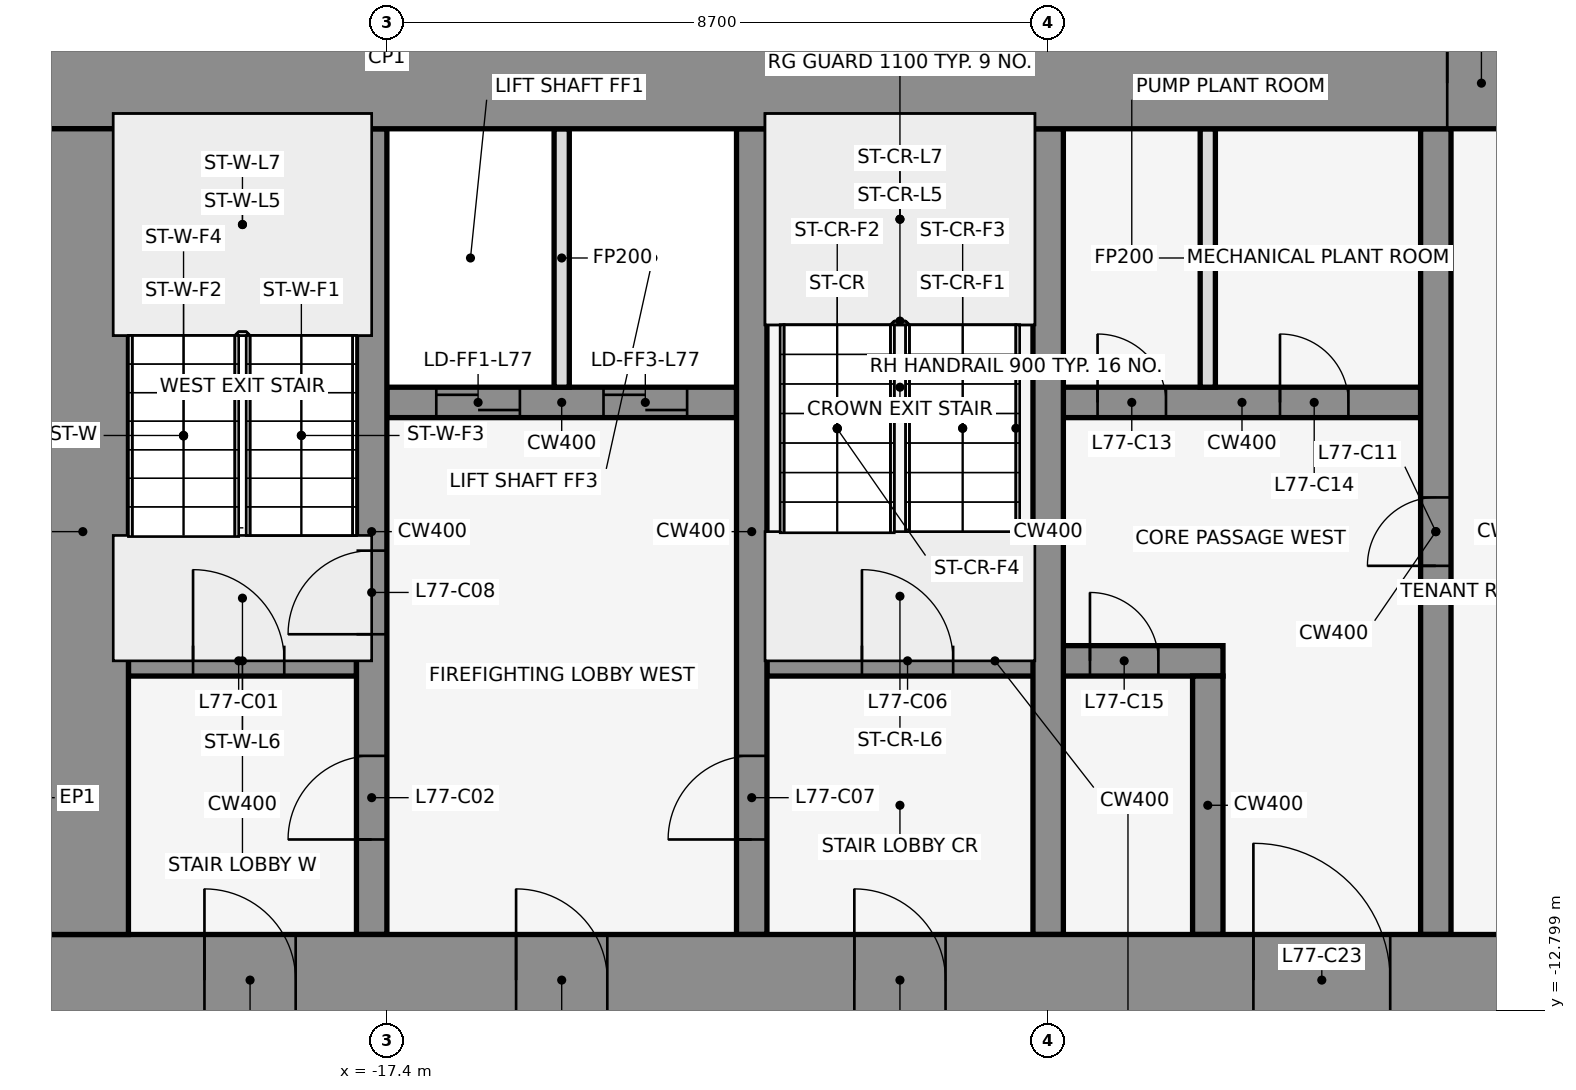
"""IFC4 building model, lengths in metres.
Left out: names, types, materials, properties, quantities, classifications, styles, units other than length and angle.
Written with IfcOpenShell. Run it as: python <this file> out.ifc"""

import sys

from ifc_helpers import new_model, si_unit, direction, frame, frame_2d, origin, place, context, subcontext, project, spatial, rectangle, extrude, element, fill, save


model = new_model("IFC4")
c1 = context("Model", 3, precision=1e-05, world=origin(), true_north=direction((0.0, 1.0)))
c2 = subcontext(c1, "Body", "Model", "MODEL_VIEW")
j1 = project(units=[si_unit("LENGTHUNIT", "METRE"), si_unit("PLANEANGLEUNIT", "RADIAN")], contexts=[c1])
p1 = place(None, origin())
s1 = spatial("IfcSite", under=j1, at=p1, CompositionType="ELEMENT")
p2 = place(p1, origin())
s2 = spatial("IfcBuilding", under=s1, at=p2, CompositionType="ELEMENT")
p3 = place(p2, frame((0.0, 0.0, 342.5)))
s3 = spatial("IfcBuildingStorey", under=s2, at=p3, CompositionType="ELEMENT", Elevation=342.5)
p4 = place(p3, frame((-14.599, 1.08, 0.0), z_axis=(0.0, 0.0, 1.0), x_axis=(-0.83981312244, -0.542875602121, 0.0)))
e1 = element("IfcWall", 1, at=p4, inside=s3, PredefinedType="STANDARD", context=c2, shape_type="SweptSolid", body=[
    extrude(rectangle(XDim=2.183, YDim=0.25, at=frame_2d((1.091, 0.0))), origin(), (0.0, 0.0, 1.0), 5.2),
])
p5 = place(p3, frame((-20.8, -8.2, 0.0), z_axis=(0.0, 0.0, 1.0), x_axis=(1.0, 0.0, 0.0)))
e2 = element("IfcWall", 2, at=p5, inside=s3, PredefinedType="SHEAR", context=c2, shape_type="SweptSolid", body=[
    extrude(rectangle(XDim=3.0, YDim=0.4, at=frame_2d((1.5, 0.0))), origin(), (0.0, 0.0, 1.0), 5.4),
])
p6 = place(p5, frame((0.85, 0.0, 0.0)))
e3 = element("IfcOpeningElement", 3, at=p6, cuts=e2, PredefinedType="OPENING", context=c2, shape_type="SweptSolid", body=[
    extrude(rectangle(XDim=1.2, YDim=2.1, at=frame_2d((0.6, 1.05))), frame((0.0, 0.212, 0.0), z_axis=(0.0, -1.0, 0.0), x_axis=(1.0, 0.0, 0.0)), (0.0, 0.0, 1.0), 0.424),
])
p7 = place(p3, frame((-12.4, -8.2, 0.0), z_axis=(0.0, 0.0, 1.0), x_axis=(1.0, 0.0, 0.0)))
e4 = element("IfcWall", 4, at=p7, inside=s3, PredefinedType="SHEAR", context=c2, shape_type="SweptSolid", body=[
    extrude(rectangle(XDim=6.0, YDim=0.4, at=frame_2d((3.0, 0.0))), origin(), (0.0, 0.0, 1.0), 5.4),
])
p8 = place(p7, frame((1.25, 0.0, 0.0)))
e5 = element("IfcOpeningElement", 5, at=p8, cuts=e4, PredefinedType="OPENING", context=c2, shape_type="SweptSolid", body=[
    extrude(rectangle(XDim=1.2, YDim=2.1, at=frame_2d((0.6, 1.05))), frame((0.0, 0.212, 0.0), z_axis=(0.0, -1.0, 0.0), x_axis=(1.0, 0.0, 0.0)), (0.0, 0.0, 1.0), 0.424),
])
p9 = place(p7, frame((4.25, 0.0, 0.0)))
e6 = element("IfcOpeningElement", 6, at=p9, cuts=e4, PredefinedType="OPENING", context=c2, shape_type="SweptSolid", body=[
    extrude(rectangle(XDim=0.9, YDim=2.1, at=frame_2d((0.45, 1.05))), frame((0.0, 0.212, 0.0), z_axis=(0.0, -1.0, 0.0), x_axis=(1.0, 0.0, 0.0)), (0.0, 0.0, 1.0), 0.424),
])
p10 = place(p3, frame((-17.4, -4.8, 0.0), z_axis=(0.0, 0.0, 1.0), x_axis=(1.0, 0.0, 0.0)))
e7 = element("IfcWall", 7, at=p10, inside=s3, PredefinedType="SHEAR", context=c2, shape_type="SweptSolid", body=[
    extrude(rectangle(XDim=4.6, YDim=0.4, at=frame_2d((2.3, 0.0))), origin(), (0.0, 0.0, 1.0), 5.4),
])
p11 = place(p10, frame((0.65, 0.0, 0.0)))
e8 = element("IfcOpeningElement", 8, at=p11, cuts=e7, PredefinedType="OPENING", context=c2, shape_type="SweptSolid", body=[
    extrude(rectangle(XDim=1.1, YDim=2.1, at=frame_2d((0.55, 1.05))), frame((0.0, 0.212, 0.0), z_axis=(0.0, -1.0, 0.0), x_axis=(1.0, 0.0, 0.0)), (0.0, 0.0, 1.0), 0.424),
])
p12 = place(p10, frame((2.85, 0.0, 0.0)))
e9 = element("IfcOpeningElement", 9, at=p12, cuts=e7, PredefinedType="OPENING", context=c2, shape_type="SweptSolid", body=[
    extrude(rectangle(XDim=1.1, YDim=2.1, at=frame_2d((0.55, 1.05))), frame((0.0, 0.212, 0.0), z_axis=(0.0, -1.0, 0.0), x_axis=(1.0, 0.0, 0.0)), (0.0, 0.0, 1.0), 0.424),
])
p13 = place(p3, frame((-8.5, -4.8, 0.0), z_axis=(0.0, 0.0, 1.0), x_axis=(1.0, 0.0, 0.0)))
e10 = element("IfcWall", 10, at=p13, inside=s3, PredefinedType="SHEAR", context=c2, shape_type="SweptSolid", body=[
    extrude(rectangle(XDim=4.7, YDim=0.4, at=frame_2d((2.35, 0.0))), origin(), (0.0, 0.0, 1.0), 5.4),
])
p14 = place(p13, frame((0.45, 0.0, 0.0)))
e11 = element("IfcOpeningElement", 11, at=p14, cuts=e10, PredefinedType="OPENING", context=c2, shape_type="SweptSolid", body=[
    extrude(rectangle(XDim=0.9, YDim=2.1, at=frame_2d((0.45, 1.05))), frame((0.0, 0.212, 0.0), z_axis=(0.0, -1.0, 0.0), x_axis=(1.0, 0.0, 0.0)), (0.0, 0.0, 1.0), 0.424),
])
p15 = place(p13, frame((2.85, 0.0, 0.0)))
e12 = element("IfcOpeningElement", 12, at=p15, cuts=e10, PredefinedType="OPENING", context=c2, shape_type="SweptSolid", body=[
    extrude(rectangle(XDim=0.9, YDim=2.1, at=frame_2d((0.45, 1.05))), frame((0.0, 0.212, 0.0), z_axis=(0.0, -1.0, 0.0), x_axis=(1.0, 0.0, 0.0)), (0.0, 0.0, 1.0), 0.424),
])
p16 = place(p3, frame((-17.6, -11.8, 0.0), z_axis=(0.0, 0.0, 1.0), x_axis=(0.0, 1.0, 0.0)))
e13 = element("IfcWall", 13, at=p16, inside=s3, PredefinedType="SHEAR", context=c2, shape_type="SweptSolid", body=[
    extrude(rectangle(XDim=10.6, YDim=0.4, at=frame_2d((5.3, 0.0))), origin(), (0.0, 0.0, 1.0), 5.4),
])
p17 = place(p16, frame((1.25, 0.0, 0.0)))
e14 = element("IfcOpeningElement", 14, at=p17, cuts=e13, PredefinedType="OPENING", context=c2, shape_type="SweptSolid", body=[
    extrude(rectangle(XDim=1.1, YDim=2.1, at=frame_2d((0.55, 1.05))), frame((0.0, 0.212, 0.0), z_axis=(0.0, -1.0, 0.0), x_axis=(1.0, 0.0, 0.0)), (0.0, 0.0, 1.0), 0.424),
])
p18 = place(p16, frame((3.95, 0.0, 0.0)))
e15 = element("IfcOpeningElement", 15, at=p18, cuts=e13, PredefinedType="OPENING", context=c2, shape_type="SweptSolid", body=[
    extrude(rectangle(XDim=1.1, YDim=2.1, at=frame_2d((0.55, 1.05))), frame((0.0, 0.212, 0.0), z_axis=(0.0, -1.0, 0.0), x_axis=(1.0, 0.0, 0.0)), (0.0, 0.0, 1.0), 0.424),
])
p19 = place(p3, frame((-15.1, -4.6, 0.0), z_axis=(0.0, 0.0, 1.0), x_axis=(0.0, 1.0, 0.0)))
e16 = element("IfcWall", 16, at=p19, inside=s3, PredefinedType="PARTITIONING", context=c2, shape_type="SweptSolid", body=[
    extrude(rectangle(XDim=3.4, YDim=0.2, at=frame_2d((1.7, 0.0))), origin(), (0.0, 0.0, 1.0), 4.268),
])
p20 = place(p3, frame((-12.6, -11.8, 0.0), z_axis=(0.0, 0.0, 1.0), x_axis=(0.0, 1.0, 0.0)))
e17 = element("IfcWall", 17, at=p20, inside=s3, PredefinedType="SHEAR", context=c2, shape_type="SweptSolid", body=[
    extrude(rectangle(XDim=10.6, YDim=0.4, at=frame_2d((5.3, 0.0))), origin(), (0.0, 0.0, 1.0), 5.4),
])
p21 = place(p20, frame((1.25, 0.0, 0.0)))
e18 = element("IfcOpeningElement", 18, at=p21, cuts=e17, PredefinedType="OPENING", context=c2, shape_type="SweptSolid", body=[
    extrude(rectangle(XDim=1.1, YDim=2.1, at=frame_2d((0.55, 1.05))), frame((0.0, 0.212, 0.0), z_axis=(0.0, -1.0, 0.0), x_axis=(1.0, 0.0, 0.0)), (0.0, 0.0, 1.0), 0.424),
])
p22 = place(p3, frame((-8.7, -11.8, 0.0), z_axis=(0.0, 0.0, 1.0), x_axis=(0.0, 1.0, 0.0)))
e19 = element("IfcWall", 19, at=p22, inside=s3, PredefinedType="SHEAR", context=c2, shape_type="SweptSolid", body=[
    extrude(rectangle(XDim=10.6, YDim=0.4, at=frame_2d((5.3, 0.0))), origin(), (0.0, 0.0, 1.0), 5.4),
])
p23 = place(p3, frame((-6.6, -11.8, 0.0), z_axis=(0.0, 0.0, 1.0), x_axis=(0.0, 1.0, 0.0)))
e20 = element("IfcWall", 20, at=p23, inside=s3, PredefinedType="SHEAR", context=c2, shape_type="SweptSolid", body=[
    extrude(rectangle(XDim=3.4, YDim=0.4, at=frame_2d((1.7, 0.0))), origin(), (0.0, 0.0, 1.0), 5.4),
])
p24 = place(p3, frame((-6.6, -4.6, 0.0), z_axis=(0.0, 0.0, 1.0), x_axis=(0.0, 1.0, 0.0)))
e21 = element("IfcWall", 21, at=p24, inside=s3, PredefinedType="PARTITIONING", context=c2, shape_type="SweptSolid", body=[
    extrude(rectangle(XDim=3.4, YDim=0.2, at=frame_2d((1.7, 0.0))), origin(), (0.0, 0.0, 1.0), 4.268),
])
p25 = place(p3, frame((-3.6, -11.8, 0.0), z_axis=(0.0, 0.0, 1.0), x_axis=(0.0, 1.0, 0.0)))
e22 = element("IfcWall", 22, at=p25, inside=s3, PredefinedType="SHEAR", context=c2, shape_type="SweptSolid", body=[
    extrude(rectangle(XDim=10.6, YDim=0.4, at=frame_2d((5.3, 0.0))), origin(), (0.0, 0.0, 1.0), 5.4),
])
p26 = place(p25, frame((4.85, 0.0, 0.0)))
e23 = element("IfcOpeningElement", 23, at=p26, cuts=e22, PredefinedType="OPENING", context=c2, shape_type="SweptSolid", body=[
    extrude(rectangle(XDim=0.9, YDim=2.1, at=frame_2d((0.45, 1.05))), frame((0.0, 0.212, 0.0), z_axis=(0.0, -1.0, 0.0), x_axis=(1.0, 0.0, 0.0)), (0.0, 0.0, 1.0), 0.424),
])
p27 = place(p3, frame((-22.0, -0.6, 0.0), z_axis=(0.0, 0.0, 1.0), x_axis=(1.0, 0.0, 0.0)))
e24 = element("IfcWall", 24, at=p27, inside=s3, PredefinedType="SHEAR", context=c2, shape_type="SweptSolid", body=[
    extrude(rectangle(XDim=44.0, YDim=1.2, at=frame_2d((22.0, 0.0))), origin(), (0.0, 0.0, 1.0), 5.4),
])
p28 = place(p27, frame((18.55, 0.0, 0.0)))
e25 = element("IfcOpeningElement", 25, at=p28, cuts=e24, PredefinedType="OPENING", context=c2, shape_type="SweptSolid", body=[
    extrude(rectangle(XDim=0.9, YDim=2.1, at=frame_2d((0.45, 1.05))), frame((0.0, 0.612, 0.0), z_axis=(0.0, -1.0, 0.0), x_axis=(1.0, 0.0, 0.0)), (0.0, 0.0, 1.0), 1.224),
])
p29 = place(p27, frame((24.55, 0.0, 0.0)))
e26 = element("IfcOpeningElement", 26, at=p29, cuts=e24, PredefinedType="OPENING", context=c2, shape_type="SweptSolid", body=[
    extrude(rectangle(XDim=0.9, YDim=2.1, at=frame_2d((0.45, 1.05))), frame((0.0, 0.612, 0.0), z_axis=(0.0, -1.0, 0.0), x_axis=(1.0, 0.0, 0.0)), (0.0, 0.0, 1.0), 1.224),
])
p30 = place(p3, frame((-22.0, -12.4, 0.0), z_axis=(0.0, 0.0, 1.0), x_axis=(1.0, 0.0, 0.0)))
e27 = element("IfcWall", 27, at=p30, inside=s3, PredefinedType="SHEAR", context=c2, shape_type="SweptSolid", body=[
    extrude(rectangle(XDim=44.0, YDim=1.2, at=frame_2d((22.0, 0.0))), origin(), (0.0, 0.0, 1.0), 5.4),
])
p31 = place(p30, frame((2.2, 0.0, 0.0)))
e28 = element("IfcOpeningElement", 28, at=p31, cuts=e27, PredefinedType="OPENING", context=c2, shape_type="SweptSolid", body=[
    extrude(rectangle(XDim=1.2, YDim=2.1, at=frame_2d((0.6, 1.05))), frame((0.0, 0.612, 0.0), z_axis=(0.0, -1.0, 0.0), x_axis=(1.0, 0.0, 0.0)), (0.0, 0.0, 1.0), 1.224),
])
p32 = place(p30, frame((21.4, 0.0, 0.0)))
e29 = element("IfcOpeningElement", 29, at=p32, cuts=e27, PredefinedType="OPENING", context=c2, shape_type="SweptSolid", body=[
    extrude(rectangle(XDim=1.2, YDim=2.1, at=frame_2d((0.6, 1.05))), frame((0.0, 0.612, 0.0), z_axis=(0.0, -1.0, 0.0), x_axis=(1.0, 0.0, 0.0)), (0.0, 0.0, 1.0), 1.224),
])
p33 = place(p30, frame((40.6, 0.0, 0.0)))
e30 = element("IfcOpeningElement", 30, at=p33, cuts=e27, PredefinedType="OPENING", context=c2, shape_type="SweptSolid", body=[
    extrude(rectangle(XDim=1.2, YDim=2.1, at=frame_2d((0.6, 1.05))), frame((0.0, 0.612, 0.0), z_axis=(0.0, -1.0, 0.0), x_axis=(1.0, 0.0, 0.0)), (0.0, 0.0, 1.0), 1.224),
])
p34 = place(p30, frame((10.75, 0.0, 0.0)))
e31 = element("IfcOpeningElement", 31, at=p34, cuts=e27, PredefinedType="OPENING", context=c2, shape_type="SweptSolid", body=[
    extrude(rectangle(XDim=1.2, YDim=2.1, at=frame_2d((0.6, 1.05))), frame((0.0, 0.612, 0.0), z_axis=(0.0, -1.0, 0.0), x_axis=(1.0, 0.0, 0.0)), (0.0, 0.0, 1.0), 1.224),
])
p35 = place(p30, frame((16.0, 0.0, 0.0)))
e32 = element("IfcOpeningElement", 32, at=p35, cuts=e27, PredefinedType="OPENING", context=c2, shape_type="SweptSolid", body=[
    extrude(rectangle(XDim=1.8, YDim=2.1, at=frame_2d((0.9, 1.05))), frame((0.0, 0.612, 0.0), z_axis=(0.0, -1.0, 0.0), x_axis=(1.0, 0.0, 0.0)), (0.0, 0.0, 1.0), 1.224),
])
p36 = place(p30, frame((6.3, 0.0, 0.0)))
e33 = element("IfcOpeningElement", 33, at=p36, cuts=e27, PredefinedType="OPENING", context=c2, shape_type="SweptSolid", body=[
    extrude(rectangle(XDim=1.2, YDim=2.1, at=frame_2d((0.6, 1.05))), frame((0.0, 0.612, 0.0), z_axis=(0.0, -1.0, 0.0), x_axis=(1.0, 0.0, 0.0)), (0.0, 0.0, 1.0), 1.224),
])
p37 = place(p30, frame((26.2, 0.0, 0.0)))
e34 = element("IfcOpeningElement", 34, at=p37, cuts=e27, PredefinedType="OPENING", context=c2, shape_type="SweptSolid", body=[
    extrude(rectangle(XDim=1.8, YDim=2.1, at=frame_2d((0.9, 1.05))), frame((0.0, 0.612, 0.0), z_axis=(0.0, -1.0, 0.0), x_axis=(1.0, 0.0, 0.0)), (0.0, 0.0, 1.0), 1.224),
])
p38 = place(p30, frame((36.5, 0.0, 0.0)))
e35 = element("IfcOpeningElement", 35, at=p38, cuts=e27, PredefinedType="OPENING", context=c2, shape_type="SweptSolid", body=[
    extrude(rectangle(XDim=1.2, YDim=2.1, at=frame_2d((0.6, 1.05))), frame((0.0, 0.612, 0.0), z_axis=(0.0, -1.0, 0.0), x_axis=(1.0, 0.0, 0.0)), (0.0, 0.0, 1.0), 1.224),
])
p39 = place(p3, frame((-21.4, -11.8, 0.0), z_axis=(0.0, 0.0, 1.0), x_axis=(0.0, 1.0, 0.0)))
e36 = element("IfcWall", 36, at=p39, inside=s3, PredefinedType="SHEAR", context=c2, shape_type="SweptSolid", body=[
    extrude(rectangle(XDim=10.6, YDim=1.2, at=frame_2d((5.3, 0.0))), origin(), (0.0, 0.0, 1.0), 5.4),
])
p40 = place(p6, origin())
e37 = element("IfcDoor", 37, at=p40, inside=s3, OperationType="SINGLE_SWING_LEFT", PredefinedType="DOOR", context=c2, shape_type="SweptSolid", body=[
    extrude(rectangle(XDim=1.2, YDim=2.1, at=frame_2d((0.6, 1.05))), frame((0.0, 0.025, 0.0), z_axis=(0.0, -1.0, 0.0), x_axis=(1.0, 0.0, 0.0)), (0.0, 0.0, 1.0), 0.05),
])
fill(e3, e37)
p41 = place(p17, frame((1.1, 0.0, 0.0), z_axis=(0.0, 0.0, 1.0), x_axis=(-1.0, 0.0, 0.0)))
e38 = element("IfcDoor", 38, at=p41, inside=s3, OperationType="SINGLE_SWING_LEFT", PredefinedType="DOOR", context=c2, shape_type="SweptSolid", body=[
    extrude(rectangle(XDim=1.1, YDim=2.1, at=frame_2d((0.55, 1.05))), frame((0.0, 0.025, 0.0), z_axis=(0.0, -1.0, 0.0), x_axis=(1.0, 0.0, 0.0)), (0.0, 0.0, 1.0), 0.05),
])
fill(e14, e38)
p42 = place(p8, origin())
e39 = element("IfcDoor", 39, at=p42, inside=s3, OperationType="SINGLE_SWING_RIGHT", PredefinedType="DOOR", context=c2, shape_type="SweptSolid", body=[
    extrude(rectangle(XDim=1.2, YDim=2.1, at=frame_2d((0.6, 1.05))), frame((0.0, 0.025, 0.0), z_axis=(0.0, -1.0, 0.0), x_axis=(1.0, 0.0, 0.0)), (0.0, 0.0, 1.0), 0.05),
])
fill(e5, e39)
p43 = place(p21, origin())
e40 = element("IfcDoor", 40, at=p43, inside=s3, OperationType="SINGLE_SWING_LEFT", PredefinedType="DOOR", context=c2, shape_type="SweptSolid", body=[
    extrude(rectangle(XDim=1.1, YDim=2.1, at=frame_2d((0.55, 1.05))), frame((0.0, 0.025, 0.0), z_axis=(0.0, -1.0, 0.0), x_axis=(1.0, 0.0, 0.0)), (0.0, 0.0, 1.0), 0.05),
])
fill(e18, e40)
p44 = place(p11, origin())
e41 = element("IfcDoor", 41, at=p44, inside=s3, OperationType="DOUBLE_DOOR_SLIDING", PredefinedType="DOOR", context=c2, shape_type="SweptSolid", body=[
    extrude(rectangle(XDim=1.1, YDim=2.1, at=frame_2d((0.55, 1.05))), frame((0.0, 0.025, 0.0), z_axis=(0.0, -1.0, 0.0), x_axis=(1.0, 0.0, 0.0)), (0.0, 0.0, 1.0), 0.05),
])
fill(e8, e41)
p45 = place(p12, origin())
e42 = element("IfcDoor", 42, at=p45, inside=s3, OperationType="DOUBLE_DOOR_SLIDING", PredefinedType="DOOR", context=c2, shape_type="SweptSolid", body=[
    extrude(rectangle(XDim=1.1, YDim=2.1, at=frame_2d((0.55, 1.05))), frame((0.0, 0.025, 0.0), z_axis=(0.0, -1.0, 0.0), x_axis=(1.0, 0.0, 0.0)), (0.0, 0.0, 1.0), 0.05),
])
fill(e9, e42)
p46 = place(p18, frame((1.1, 0.0, 0.0), z_axis=(0.0, 0.0, 1.0), x_axis=(-1.0, 0.0, 0.0)))
e43 = element("IfcDoor", 43, at=p46, inside=s3, OperationType="SINGLE_SWING_LEFT", PredefinedType="DOOR", context=c2, shape_type="SweptSolid", body=[
    extrude(rectangle(XDim=1.1, YDim=2.1, at=frame_2d((0.55, 1.05))), frame((0.0, 0.025, 0.0), z_axis=(0.0, -1.0, 0.0), x_axis=(1.0, 0.0, 0.0)), (0.0, 0.0, 1.0), 0.05),
])
fill(e15, e43)
p47 = place(p26, frame((0.9, 0.0, 0.0), z_axis=(0.0, 0.0, 1.0), x_axis=(-1.0, 0.0, 0.0)))
e44 = element("IfcDoor", 44, at=p47, inside=s3, OperationType="SINGLE_SWING_RIGHT", PredefinedType="DOOR", context=c2, shape_type="SweptSolid", body=[
    extrude(rectangle(XDim=0.9, YDim=2.1, at=frame_2d((0.45, 1.05))), frame((0.0, 0.025, 0.0), z_axis=(0.0, -1.0, 0.0), x_axis=(1.0, 0.0, 0.0)), (0.0, 0.0, 1.0), 0.05),
])
fill(e23, e44)
p48 = place(p14, origin())
e45 = element("IfcDoor", 45, at=p48, inside=s3, OperationType="SINGLE_SWING_LEFT", PredefinedType="DOOR", context=c2, shape_type="SweptSolid", body=[
    extrude(rectangle(XDim=0.9, YDim=2.1, at=frame_2d((0.45, 1.05))), frame((0.0, 0.025, 0.0), z_axis=(0.0, -1.0, 0.0), x_axis=(1.0, 0.0, 0.0)), (0.0, 0.0, 1.0), 0.05),
])
fill(e11, e45)
p49 = place(p15, origin())
e46 = element("IfcDoor", 46, at=p49, inside=s3, OperationType="SINGLE_SWING_RIGHT", PredefinedType="DOOR", context=c2, shape_type="SweptSolid", body=[
    extrude(rectangle(XDim=0.9, YDim=2.1, at=frame_2d((0.45, 1.05))), frame((0.0, 0.025, 0.0), z_axis=(0.0, -1.0, 0.0), x_axis=(1.0, 0.0, 0.0)), (0.0, 0.0, 1.0), 0.05),
])
fill(e12, e46)
p50 = place(p9, frame((0.9, 0.0, 0.0), z_axis=(0.0, 0.0, 1.0), x_axis=(-1.0, 0.0, 0.0)))
e47 = element("IfcDoor", 47, at=p50, inside=s3, OperationType="SINGLE_SWING_RIGHT", PredefinedType="DOOR", context=c2, shape_type="SweptSolid", body=[
    extrude(rectangle(XDim=0.9, YDim=2.1, at=frame_2d((0.45, 1.05))), frame((0.0, 0.025, 0.0), z_axis=(0.0, -1.0, 0.0), x_axis=(1.0, 0.0, 0.0)), (0.0, 0.0, 1.0), 0.05),
])
fill(e6, e47)
p51 = place(p28, origin())
e48 = element("IfcDoor", 48, at=p51, inside=s3, OperationType="SINGLE_SWING_LEFT", PredefinedType="DOOR", context=c2, shape_type="SweptSolid", body=[
    extrude(rectangle(XDim=0.9, YDim=2.1, at=frame_2d((0.45, 1.05))), frame((0.0, 0.025, 0.0), z_axis=(0.0, -1.0, 0.0), x_axis=(1.0, 0.0, 0.0)), (0.0, 0.0, 1.0), 0.05),
])
fill(e25, e48)
p52 = place(p31, frame((1.2, 0.0, 0.0), z_axis=(0.0, 0.0, 1.0), x_axis=(-1.0, 0.0, 0.0)))
e49 = element("IfcDoor", 49, at=p52, inside=s3, OperationType="SINGLE_SWING_RIGHT", PredefinedType="DOOR", context=c2, shape_type="SweptSolid", body=[
    extrude(rectangle(XDim=1.2, YDim=2.1, at=frame_2d((0.6, 1.05))), frame((0.0, 0.025, 0.0), z_axis=(0.0, -1.0, 0.0), x_axis=(1.0, 0.0, 0.0)), (0.0, 0.0, 1.0), 0.05),
])
fill(e28, e49)
p53 = place(p34, frame((1.2, 0.0, 0.0), z_axis=(0.0, 0.0, 1.0), x_axis=(-1.0, 0.0, 0.0)))
e50 = element("IfcDoor", 50, at=p53, inside=s3, OperationType="SINGLE_SWING_RIGHT", PredefinedType="DOOR", context=c2, shape_type="SweptSolid", body=[
    extrude(rectangle(XDim=1.2, YDim=2.1, at=frame_2d((0.6, 1.05))), frame((0.0, 0.025, 0.0), z_axis=(0.0, -1.0, 0.0), x_axis=(1.0, 0.0, 0.0)), (0.0, 0.0, 1.0), 0.05),
])
fill(e31, e50)
p54 = place(p35, origin())
e51 = element("IfcDoor", 51, at=p54, inside=s3, OperationType="SINGLE_SWING_LEFT", PredefinedType="DOOR", context=c2, shape_type="SweptSolid", body=[
    extrude(rectangle(XDim=1.8, YDim=2.1, at=frame_2d((0.9, 1.05))), frame((0.0, 0.025, 0.0), z_axis=(0.0, -1.0, 0.0), x_axis=(1.0, 0.0, 0.0)), (0.0, 0.0, 1.0), 0.05),
])
fill(e32, e51)
p55 = place(p36, frame((1.2, 0.0, 0.0), z_axis=(0.0, 0.0, 1.0), x_axis=(-1.0, 0.0, 0.0)))
e52 = element("IfcDoor", 52, at=p55, inside=s3, OperationType="SINGLE_SWING_RIGHT", PredefinedType="DOOR", context=c2, shape_type="SweptSolid", body=[
    extrude(rectangle(XDim=1.2, YDim=2.1, at=frame_2d((0.6, 1.05))), frame((0.0, 0.025, 0.0), z_axis=(0.0, -1.0, 0.0), x_axis=(1.0, 0.0, 0.0)), (0.0, 0.0, 1.0), 0.05),
])
fill(e33, e52)
save(model, sys.argv[1])
